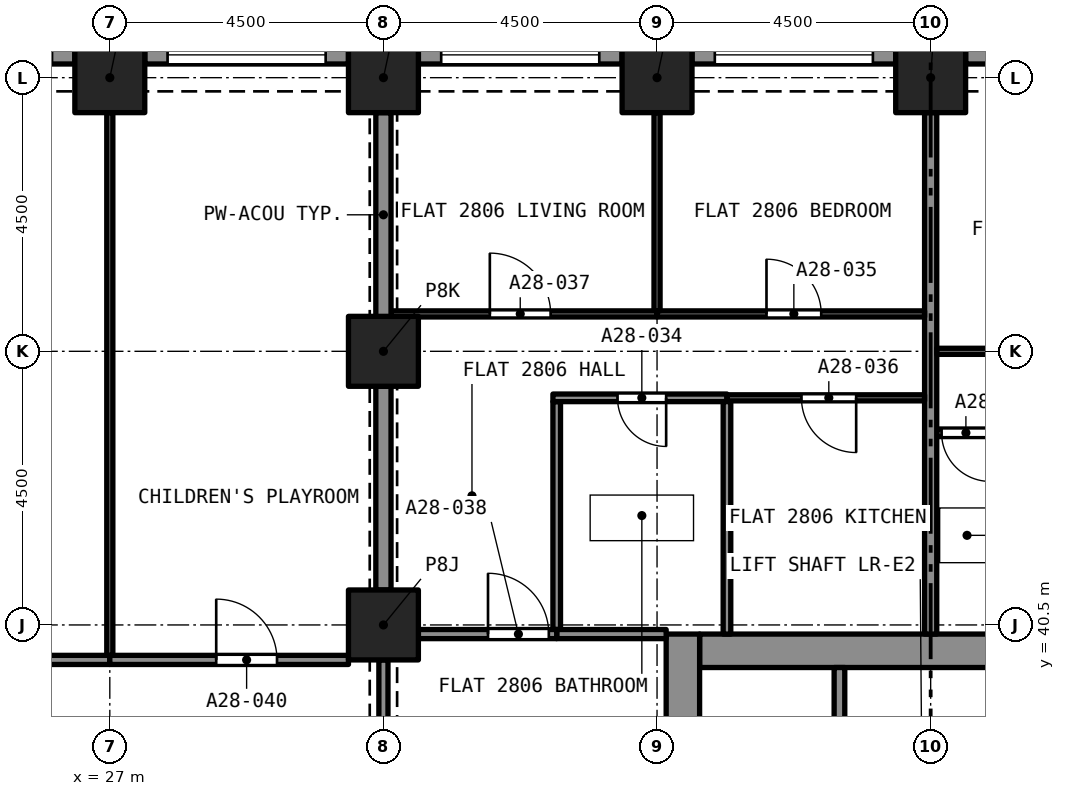
"""IFC4 building model, lengths in metres.
Left out: names, types, materials, properties, quantities, classifications, styles, units other than length and angle.
Written with IfcOpenShell. Run it as: python <this file> out.ifc"""

import sys

from ifc_helpers import new_model, si_unit, direction, frame, frame_2d, origin, origin_2d, place, context, subcontext, project, spatial, rectangle, extrude, element, fill, save


model = new_model("IFC4")
c1 = context("Model", 3, precision=1e-05, world=origin(), true_north=direction((0.0, 1.0)))
c2 = subcontext(c1, "Body", "Model", "MODEL_VIEW")
j1 = project(units=[si_unit("LENGTHUNIT", "METRE"), si_unit("PLANEANGLEUNIT", "RADIAN")], contexts=[c1])
p1 = place(None, origin())
s1 = spatial("IfcSite", under=j1, at=p1, CompositionType="ELEMENT")
p2 = place(p1, origin())
s2 = spatial("IfcBuilding", under=s1, at=p2, CompositionType="ELEMENT")
p3 = place(p2, frame((0.0, 0.0, 102.4)))
s3 = spatial("IfcBuildingStorey", under=s2, at=p3, CompositionType="ELEMENT", Elevation=102.4)
for number, where, z_axis, x_axis in (
    (1, (31.5, 40.5, 0.0), (0.0, 0.0, 1.0), (1.0, 0.0, 0.0)),
    (2, (31.5, 45.0, 0.0), (0.0, 0.0, 1.0), (1.0, 0.0, 0.0)),
    (3, (27.0, 49.5, 0.0), (0.0, 0.0, 1.0), (1.0, 0.0, 0.0)),
    (4, (31.5, 49.5, 0.0), (0.0, 0.0, 1.0), (1.0, 0.0, 0.0)),
    (5, (36.0, 49.5, 0.0), (0.0, 0.0, 1.0), (1.0, 0.0, 0.0)),
    (6, (40.5, 49.5, 0.0), (0.0, 0.0, 1.0), (1.0, 0.0, 0.0)),
):
    element("IfcColumn", number, at=place(p3, frame(where, z_axis=z_axis, x_axis=x_axis)), inside=s3, PredefinedType="COLUMN", context=c2, shape_type="SweptSolid", body=[
        extrude(rectangle(XDim=1.15, YDim=1.15, at=origin_2d()), origin(), (0.0, 0.0, 1.0), 3.2),
    ])
p4 = place(p3, frame((36.7, 40.075, 0.0), z_axis=(0.0, 0.0, 1.0), x_axis=(1.0, 0.0, 0.0)))
e7 = element("IfcWall", 7, at=p4, inside=s3, PredefinedType="SOLIDWALL", context=c2, shape_type="SweptSolid", body=[
    extrude(rectangle(XDim=7.6, YDim=0.55, at=frame_2d((3.8, 0.0))), origin(), (0.0, 0.0, 1.0), 3.2),
])
p5 = place(p3, frame((36.425, 27.15, 0.0), z_axis=(0.0, 0.0, 1.0), x_axis=(0.0, 1.0, 0.0)))
e8 = element("IfcWall", 8, at=p5, inside=s3, PredefinedType="SOLIDWALL", context=c2, shape_type="SweptSolid", body=[
    extrude(rectangle(XDim=13.2, YDim=0.55, at=frame_2d((6.6, 0.0))), origin(), (0.0, 0.0, 1.0), 3.2),
])
p6 = place(p5, frame((8.8, 0.0, 0.0)))
e9 = element("IfcOpeningElement", 9, at=p6, cuts=e8, PredefinedType="OPENING", context=c2, shape_type="SweptSolid", body=[
    extrude(rectangle(XDim=1.2, YDim=2.1, at=frame_2d((0.6, 1.05))), frame((0.0, 0.285, 0.0), z_axis=(0.0, -1.0, 0.0), x_axis=(1.0, 0.0, 0.0)), (0.0, 0.0, 1.0), 0.57),
])
p7 = place(p3, frame((41.075, 49.875, 0.0), z_axis=(0.0, 0.0, 1.0), x_axis=(1.0, 0.0, 0.0)))
e10 = element("IfcWall", 10, at=p7, inside=s3, PredefinedType="SOLIDWALL", context=c2, shape_type="SweptSolid", body=[
    extrude(rectangle(XDim=3.35, YDim=0.3, at=frame_2d((1.675, 0.0))), origin(), (0.0, 0.0, 1.0), 3.2),
])
p8 = place(p7, frame((0.375, 0.0, 0.45)))
e11 = element("IfcOpeningElement", 11, at=p8, cuts=e10, PredefinedType="OPENING", context=c2, shape_type="SweptSolid", body=[
    extrude(rectangle(XDim=2.6, YDim=1.95, at=frame_2d((1.3, 0.975))), frame((0.0, 0.16, 0.0), z_axis=(0.0, -1.0, 0.0), x_axis=(1.0, 0.0, 0.0)), (0.0, 0.0, 1.0), 0.32),
])
p9 = place(p3, frame((36.575, 49.875, 0.0), z_axis=(0.0, 0.0, 1.0), x_axis=(1.0, 0.0, 0.0)))
e12 = element("IfcWall", 12, at=p9, inside=s3, PredefinedType="SOLIDWALL", context=c2, shape_type="SweptSolid", body=[
    extrude(rectangle(XDim=3.35, YDim=0.3, at=frame_2d((1.675, 0.0))), origin(), (0.0, 0.0, 1.0), 3.2),
])
p10 = place(p9, frame((0.375, 0.0, 0.45)))
e13 = element("IfcOpeningElement", 13, at=p10, cuts=e12, PredefinedType="OPENING", context=c2, shape_type="SweptSolid", body=[
    extrude(rectangle(XDim=2.6, YDim=1.95, at=frame_2d((1.3, 0.975))), frame((0.0, 0.16, 0.0), z_axis=(0.0, -1.0, 0.0), x_axis=(1.0, 0.0, 0.0)), (0.0, 0.0, 1.0), 0.32),
])
p11 = place(p3, frame((32.075, 49.875, 0.0), z_axis=(0.0, 0.0, 1.0), x_axis=(1.0, 0.0, 0.0)))
e14 = element("IfcWall", 14, at=p11, inside=s3, PredefinedType="SOLIDWALL", context=c2, shape_type="SweptSolid", body=[
    extrude(rectangle(XDim=3.35, YDim=0.3, at=frame_2d((1.675, 0.0))), origin(), (0.0, 0.0, 1.0), 3.2),
])
p12 = place(p11, frame((0.375, 0.0, 0.45)))
e15 = element("IfcOpeningElement", 15, at=p12, cuts=e14, PredefinedType="OPENING", context=c2, shape_type="SweptSolid", body=[
    extrude(rectangle(XDim=2.6, YDim=1.95, at=frame_2d((1.3, 0.975))), frame((0.0, 0.16, 0.0), z_axis=(0.0, -1.0, 0.0), x_axis=(1.0, 0.0, 0.0)), (0.0, 0.0, 1.0), 0.32),
])
p13 = place(p3, frame((27.575, 49.875, 0.0), z_axis=(0.0, 0.0, 1.0), x_axis=(1.0, 0.0, 0.0)))
e16 = element("IfcWall", 16, at=p13, inside=s3, PredefinedType="SOLIDWALL", context=c2, shape_type="SweptSolid", body=[
    extrude(rectangle(XDim=3.35, YDim=0.3, at=frame_2d((1.675, 0.0))), origin(), (0.0, 0.0, 1.0), 3.2),
])
p14 = place(p13, frame((0.375, 0.0, 0.45)))
e17 = element("IfcOpeningElement", 17, at=p14, cuts=e16, PredefinedType="OPENING", context=c2, shape_type="SweptSolid", body=[
    extrude(rectangle(XDim=2.6, YDim=1.95, at=frame_2d((1.3, 0.975))), frame((0.0, 0.16, 0.0), z_axis=(0.0, -1.0, 0.0), x_axis=(1.0, 0.0, 0.0)), (0.0, 0.0, 1.0), 0.32),
])
p15 = place(p3, frame((23.075, 49.875, 0.0), z_axis=(0.0, 0.0, 1.0), x_axis=(1.0, 0.0, 0.0)))
e18 = element("IfcWall", 18, at=p15, inside=s3, PredefinedType="SOLIDWALL", context=c2, shape_type="SweptSolid", body=[
    extrude(rectangle(XDim=3.35, YDim=0.3, at=frame_2d((1.675, 0.0))), origin(), (0.0, 0.0, 1.0), 3.2),
])
p16 = place(p15, frame((0.375, 0.0, 0.45)))
e19 = element("IfcOpeningElement", 19, at=p16, cuts=e18, PredefinedType="OPENING", context=c2, shape_type="SweptSolid", body=[
    extrude(rectangle(XDim=2.6, YDim=1.95, at=frame_2d((1.3, 0.975))), frame((0.0, 0.16, 0.0), z_axis=(0.0, -1.0, 0.0), x_axis=(1.0, 0.0, 0.0)), (0.0, 0.0, 1.0), 0.32),
])
p17 = place(p3, frame((41.659, 43.66, 0.0), z_axis=(0.0, 0.0, 1.0), x_axis=(-1.0, 0.0, 0.0)))
e20 = element("IfcWall", 20, at=p17, inside=s3, PredefinedType="PARTITIONING", context=c2, shape_type="SweptSolid", body=[
    extrude(rectangle(XDim=1.059, YDim=0.125, at=frame_2d((0.53, 0.0))), origin(), (0.0, 0.0, 1.0), 2.9),
])
p18 = place(p17, frame((0.179, 0.0, 0.0)))
e21 = element("IfcOpeningElement", 21, at=p18, cuts=e20, PredefinedType="OPENING", context=c2, shape_type="SweptSolid", body=[
    extrude(rectangle(XDim=0.8, YDim=2.1, at=frame_2d((0.4, 1.05))), frame((0.0, 0.073, 0.0), z_axis=(0.0, -1.0, 0.0), x_axis=(1.0, 0.0, 0.0)), (0.0, 0.0, 1.0), 0.145),
])
p19 = place(p3, frame((40.5, 40.35, 0.0), z_axis=(0.0, 0.0, 1.0), x_axis=(0.0, 1.0, 0.0)))
e22 = element("IfcWall", 22, at=p19, inside=s3, PredefinedType="PARTITIONING", context=c2, shape_type="SweptSolid", body=[
    extrude(rectangle(XDim=8.575, YDim=0.2, at=frame_2d((4.288, 0.0))), origin(), (0.0, 0.0, 1.0), 2.9),
])
p20 = place(p3, frame((40.6, 45.0, 0.0), z_axis=(0.0, 0.0, 1.0), x_axis=(1.0, 0.0, 0.0)))
e23 = element("IfcWall", 23, at=p20, inside=s3, PredefinedType="PARTITIONING", context=c2, shape_type="SweptSolid", body=[
    extrude(rectangle(XDim=4.4, YDim=0.1, at=frame_2d((2.2, 0.0))), origin(), (0.0, 0.0, 1.0), 2.9),
])
p21 = place(p20, frame((1.7, 0.0, 0.0)))
e24 = element("IfcOpeningElement", 24, at=p21, cuts=e23, PredefinedType="OPENING", context=c2, shape_type="SweptSolid", body=[
    extrude(rectangle(XDim=0.9, YDim=2.1, at=frame_2d((0.45, 1.05))), frame((0.0, 0.06, 0.0), z_axis=(0.0, -1.0, 0.0), x_axis=(1.0, 0.0, 0.0)), (0.0, 0.0, 1.0), 0.12),
])
p22 = place(p3, frame((34.35, 40.425, 0.0), z_axis=(0.0, 0.0, 1.0), x_axis=(0.0, 1.0, 0.0)))
e25 = element("IfcWall", 25, at=p22, inside=s3, PredefinedType="PARTITIONING", context=c2, shape_type="SweptSolid", body=[
    extrude(rectangle(XDim=3.748, YDim=0.125, at=frame_2d((1.874, 0.0))), origin(), (0.0, 0.0, 1.0), 2.9),
])
p23 = place(p3, frame((37.15, 44.235, 0.0), z_axis=(0.0, 0.0, 1.0), x_axis=(-1.0, 0.0, 0.0)))
e26 = element("IfcWall", 26, at=p23, inside=s3, PredefinedType="PARTITIONING", context=c2, shape_type="SweptSolid", body=[
    extrude(rectangle(XDim=2.862, YDim=0.125, at=frame_2d((1.431, 0.0))), origin(), (0.0, 0.0, 1.0), 2.9),
])
p24 = place(p23, frame((1.0, 0.0, 0.0)))
e27 = element("IfcOpeningElement", 27, at=p24, cuts=e26, PredefinedType="OPENING", context=c2, shape_type="SweptSolid", body=[
    extrude(rectangle(XDim=0.8, YDim=2.1, at=frame_2d((0.4, 1.05))), frame((0.0, 0.073, 0.0), z_axis=(0.0, -1.0, 0.0), x_axis=(1.0, 0.0, 0.0)), (0.0, 0.0, 1.0), 0.145),
])
p25 = place(p3, frame((37.15, 40.35, 0.0), z_axis=(0.0, 0.0, 1.0), x_axis=(0.0, 1.0, 0.0)))
e28 = element("IfcWall", 28, at=p25, inside=s3, PredefinedType="PARTITIONING", context=c2, shape_type="SweptSolid", body=[
    extrude(rectangle(XDim=3.823, YDim=0.125, at=frame_2d((1.911, 0.0))), origin(), (0.0, 0.0, 1.0), 2.9),
])
p26 = place(p3, frame((34.35, 40.35, 0.0), z_axis=(0.0, 0.0, 1.0), x_axis=(1.0, 0.0, 0.0)))
e29 = element("IfcWall", 29, at=p26, inside=s3, PredefinedType="PARTITIONING", context=c2, shape_type="SweptSolid", body=[
    extrude(rectangle(XDim=1.8, YDim=0.15, at=frame_2d((0.9, 0.0))), origin(), (0.0, 0.0, 1.0), 2.9),
])
p27 = place(p3, frame((36.0, 45.615, 0.0), z_axis=(0.0, 0.0, 1.0), x_axis=(1.0, 0.0, 0.0)))
e30 = element("IfcWall", 30, at=p27, inside=s3, PredefinedType="PARTITIONING", context=c2, shape_type="SweptSolid", body=[
    extrude(rectangle(XDim=4.4, YDim=0.1, at=frame_2d((2.2, 0.0))), origin(), (0.0, 0.0, 1.0), 2.9),
])
p28 = place(p27, frame((1.8, 0.0, 0.0)))
e31 = element("IfcOpeningElement", 31, at=p28, cuts=e30, PredefinedType="OPENING", context=c2, shape_type="SweptSolid", body=[
    extrude(rectangle(XDim=0.9, YDim=2.1, at=frame_2d((0.45, 1.05))), frame((0.0, 0.06, 0.0), z_axis=(0.0, -1.0, 0.0), x_axis=(1.0, 0.0, 0.0)), (0.0, 0.0, 1.0), 0.12),
])
p29 = place(p3, frame((36.0, 45.665, 0.0), z_axis=(0.0, 0.0, 1.0), x_axis=(0.0, 1.0, 0.0)))
e32 = element("IfcWall", 32, at=p29, inside=s3, PredefinedType="PARTITIONING", context=c2, shape_type="SweptSolid", body=[
    extrude(rectangle(XDim=3.26, YDim=0.1, at=frame_2d((1.63, 0.0))), origin(), (0.0, 0.0, 1.0), 2.9),
])
p30 = place(p3, frame((40.4, 44.235, 0.0), z_axis=(0.0, 0.0, 1.0), x_axis=(-1.0, 0.0, 0.0)))
e33 = element("IfcWall", 33, at=p30, inside=s3, PredefinedType="PARTITIONING", context=c2, shape_type="SweptSolid", body=[
    extrude(rectangle(XDim=3.25, YDim=0.1, at=frame_2d((1.625, 0.0))), origin(), (0.0, 0.0, 1.0), 2.9),
])
p31 = place(p30, frame((1.125, 0.0, 0.0)))
e34 = element("IfcOpeningElement", 34, at=p31, cuts=e33, PredefinedType="OPENING", context=c2, shape_type="SweptSolid", body=[
    extrude(rectangle(XDim=0.9, YDim=2.1, at=frame_2d((0.45, 1.05))), frame((0.0, 0.06, 0.0), z_axis=(0.0, -1.0, 0.0), x_axis=(1.0, 0.0, 0.0)), (0.0, 0.0, 1.0), 0.12),
])
p32 = place(p3, frame((31.625, 45.615, 0.0), z_axis=(0.0, 0.0, 1.0), x_axis=(1.0, 0.0, 0.0)))
e35 = element("IfcWall", 35, at=p32, inside=s3, PredefinedType="PARTITIONING", context=c2, shape_type="SweptSolid", body=[
    extrude(rectangle(XDim=4.375, YDim=0.1, at=frame_2d((2.188, 0.0))), origin(), (0.0, 0.0, 1.0), 2.9),
])
p33 = place(p32, frame((1.625, 0.0, 0.0)))
e36 = element("IfcOpeningElement", 36, at=p33, cuts=e35, PredefinedType="OPENING", context=c2, shape_type="SweptSolid", body=[
    extrude(rectangle(XDim=1.0, YDim=2.1, at=frame_2d((0.5, 1.05))), frame((0.0, 0.06, 0.0), z_axis=(0.0, -1.0, 0.0), x_axis=(1.0, 0.0, 0.0)), (0.0, 0.0, 1.0), 0.12),
])
p34 = place(p3, frame((31.5, 41.075, 0.0), z_axis=(0.0, 0.0, 1.0), x_axis=(0.0, 1.0, 0.0)))
e37 = element("IfcWall", 37, at=p34, inside=s3, PredefinedType="PARTITIONING", context=c2, shape_type="SweptSolid", body=[
    extrude(rectangle(XDim=3.35, YDim=0.25, at=frame_2d((1.675, 0.0))), origin(), (0.0, 0.0, 1.0), 2.38),
])
p35 = place(p3, frame((32.075, 40.35, 0.0), z_axis=(0.0, 0.0, 1.0), x_axis=(1.0, 0.0, 0.0)))
e38 = element("IfcWall", 38, at=p35, inside=s3, PredefinedType="PARTITIONING", context=c2, shape_type="SweptSolid", body=[
    extrude(rectangle(XDim=2.275, YDim=0.15, at=frame_2d((1.138, 0.0))), origin(), (0.0, 0.0, 1.0), 2.9),
])
p36 = place(p35, frame((1.145, 0.0, 0.0)))
e39 = element("IfcOpeningElement", 39, at=p36, cuts=e38, PredefinedType="OPENING", context=c2, shape_type="SweptSolid", body=[
    extrude(rectangle(XDim=1.0, YDim=2.1, at=frame_2d((0.5, 1.05))), frame((0.0, 0.085, 0.0), z_axis=(0.0, -1.0, 0.0), x_axis=(1.0, 0.0, 0.0)), (0.0, 0.0, 1.0), 0.17),
])
p37 = place(p3, frame((31.5, 45.565, 0.0), z_axis=(0.0, 0.0, 1.0), x_axis=(0.0, 1.0, 0.0)))
e40 = element("IfcWall", 40, at=p37, inside=s3, PredefinedType="PARTITIONING", context=c2, shape_type="SweptSolid", body=[
    extrude(rectangle(XDim=3.36, YDim=0.25, at=frame_2d((1.68, 0.0))), origin(), (0.0, 0.0, 1.0), 2.38),
])
p38 = place(p3, frame((18.575, 39.925, 0.0), z_axis=(0.0, 0.0, 1.0), x_axis=(1.0, 0.0, 0.0)))
e41 = element("IfcWall", 41, at=p38, inside=s3, PredefinedType="PARTITIONING", context=c2, shape_type="SweptSolid", body=[
    extrude(rectangle(XDim=8.425, YDim=0.15, at=frame_2d((4.212, 0.0))), origin(), (0.0, 0.0, 1.0), 2.75),
])
p39 = place(p38, frame((3.425, 0.0, 0.0)))
e42 = element("IfcOpeningElement", 42, at=p39, cuts=e41, PredefinedType="OPENING", context=c2, shape_type="SweptSolid", body=[
    extrude(rectangle(XDim=1.0, YDim=2.1, at=frame_2d((0.5, 1.05))), frame((0.0, 0.085, 0.0), z_axis=(0.0, -1.0, 0.0), x_axis=(1.0, 0.0, 0.0)), (0.0, 0.0, 1.0), 0.17),
])
p40 = place(p3, frame((27.0, 39.925, 0.0), z_axis=(0.0, 0.0, 1.0), x_axis=(1.0, 0.0, 0.0)))
e43 = element("IfcWall", 43, at=p40, inside=s3, PredefinedType="PARTITIONING", context=c2, shape_type="SweptSolid", body=[
    extrude(rectangle(XDim=3.925, YDim=0.15, at=frame_2d((1.962, 0.0))), origin(), (0.0, 0.0, 1.0), 2.75),
])
p41 = place(p40, frame((1.75, 0.0, 0.0)))
e44 = element("IfcOpeningElement", 44, at=p41, cuts=e43, PredefinedType="OPENING", context=c2, shape_type="SweptSolid", body=[
    extrude(rectangle(XDim=1.0, YDim=2.1, at=frame_2d((0.5, 1.05))), frame((0.0, 0.085, 0.0), z_axis=(0.0, -1.0, 0.0), x_axis=(1.0, 0.0, 0.0)), (0.0, 0.0, 1.0), 0.17),
])
p42 = place(p3, frame((31.5, 36.575, 0.0), z_axis=(0.0, 0.0, 1.0), x_axis=(0.0, 1.0, 0.0)))
e45 = element("IfcWall", 45, at=p42, inside=s3, PredefinedType="PARTITIONING", context=c2, shape_type="SweptSolid", body=[
    extrude(rectangle(XDim=3.35, YDim=0.15, at=frame_2d((1.675, 0.0))), origin(), (0.0, 0.0, 1.0), 2.38),
])
p43 = place(p42, frame((1.075, 0.0, 0.0)))
e46 = element("IfcOpeningElement", 46, at=p43, cuts=e45, PredefinedType="OPENING", context=c2, shape_type="SweptSolid", body=[
    extrude(rectangle(XDim=1.2, YDim=2.1, at=frame_2d((0.6, 1.05))), frame((0.0, 0.085, 0.0), z_axis=(0.0, -1.0, 0.0), x_axis=(1.0, 0.0, 0.0)), (0.0, 0.0, 1.0), 0.17),
])
p44 = place(p3, frame((27.0, 40.0, 0.0), z_axis=(0.0, 0.0, 1.0), x_axis=(0.0, 1.0, 0.0)))
e47 = element("IfcWall", 47, at=p44, inside=s3, PredefinedType="PARTITIONING", context=c2, shape_type="SweptSolid", body=[
    extrude(rectangle(XDim=8.925, YDim=0.1, at=frame_2d((4.462, 0.0))), origin(), (0.0, 0.0, 1.0), 2.75),
])
p45 = place(p3, frame((39.0, 37.5, 0.0), z_axis=(0.0, 0.0, 1.0), x_axis=(0.0, 1.0, 0.0)))
e48 = element("IfcWall", 48, at=p45, inside=s3, PredefinedType="SOLIDWALL", context=c2, shape_type="SweptSolid", body=[
    extrude(rectangle(XDim=2.3, YDim=0.175, at=frame_2d((1.15, 0.0))), origin(), (0.0, 0.0, 1.0), 2.9),
])
p46 = place(p10, origin())
e49 = element("IfcWindow", 49, at=p46, inside=s3, PartitioningType="SINGLE_PANEL", PredefinedType="WINDOW", context=c2, shape_type="SweptSolid", body=[
    extrude(rectangle(XDim=2.6, YDim=1.95, at=frame_2d((1.3, 0.975))), frame((0.0, 0.03, 0.0), z_axis=(0.0, -1.0, 0.0), x_axis=(1.0, 0.0, 0.0)), (0.0, 0.0, 1.0), 0.06),
])
fill(e13, e49)
p47 = place(p12, origin())
e50 = element("IfcWindow", 50, at=p47, inside=s3, PartitioningType="SINGLE_PANEL", PredefinedType="WINDOW", context=c2, shape_type="SweptSolid", body=[
    extrude(rectangle(XDim=2.6, YDim=1.95, at=frame_2d((1.3, 0.975))), frame((0.0, 0.03, 0.0), z_axis=(0.0, -1.0, 0.0), x_axis=(1.0, 0.0, 0.0)), (0.0, 0.0, 1.0), 0.06),
])
fill(e15, e50)
p48 = place(p14, origin())
e51 = element("IfcWindow", 51, at=p48, inside=s3, PartitioningType="SINGLE_PANEL", PredefinedType="WINDOW", context=c2, shape_type="SweptSolid", body=[
    extrude(rectangle(XDim=2.6, YDim=1.95, at=frame_2d((1.3, 0.975))), frame((0.0, 0.03, 0.0), z_axis=(0.0, -1.0, 0.0), x_axis=(1.0, 0.0, 0.0)), (0.0, 0.0, 1.0), 0.06),
])
fill(e17, e51)
p49 = place(p18, origin())
e52 = element("IfcDoor", 52, at=p49, inside=s3, OperationType="SINGLE_SWING_RIGHT", PredefinedType="DOOR", context=c2, shape_type="SweptSolid", body=[
    extrude(rectangle(XDim=0.8, YDim=2.1, at=frame_2d((0.4, 1.05))), frame((0.0, 0.025, 0.0), z_axis=(0.0, -1.0, 0.0), x_axis=(1.0, 0.0, 0.0)), (0.0, 0.0, 1.0), 0.05),
])
fill(e21, e52)
p50 = place(p24, origin())
e53 = element("IfcDoor", 53, at=p50, inside=s3, OperationType="SINGLE_SWING_LEFT", PredefinedType="DOOR", context=c2, shape_type="SweptSolid", body=[
    extrude(rectangle(XDim=0.8, YDim=2.1, at=frame_2d((0.4, 1.05))), frame((0.0, 0.025, 0.0), z_axis=(0.0, -1.0, 0.0), x_axis=(1.0, 0.0, 0.0)), (0.0, 0.0, 1.0), 0.05),
])
fill(e27, e53)
p51 = place(p28, origin())
e54 = element("IfcDoor", 54, at=p51, inside=s3, OperationType="SINGLE_SWING_RIGHT", PredefinedType="DOOR", context=c2, shape_type="SweptSolid", body=[
    extrude(rectangle(XDim=0.9, YDim=2.1, at=frame_2d((0.45, 1.05))), frame((0.0, 0.025, 0.0), z_axis=(0.0, -1.0, 0.0), x_axis=(1.0, 0.0, 0.0)), (0.0, 0.0, 1.0), 0.05),
])
fill(e31, e54)
p52 = place(p31, origin())
e55 = element("IfcDoor", 55, at=p52, inside=s3, OperationType="SINGLE_SWING_LEFT", PredefinedType="DOOR", context=c2, shape_type="SweptSolid", body=[
    extrude(rectangle(XDim=0.9, YDim=2.1, at=frame_2d((0.45, 1.05))), frame((0.0, 0.025, 0.0), z_axis=(0.0, -1.0, 0.0), x_axis=(1.0, 0.0, 0.0)), (0.0, 0.0, 1.0), 0.05),
])
fill(e34, e55)
p53 = place(p33, origin())
e56 = element("IfcDoor", 56, at=p53, inside=s3, OperationType="SINGLE_SWING_LEFT", PredefinedType="DOOR", context=c2, shape_type="SweptSolid", body=[
    extrude(rectangle(XDim=1.0, YDim=2.1, at=frame_2d((0.5, 1.05))), frame((0.0, 0.025, 0.0), z_axis=(0.0, -1.0, 0.0), x_axis=(1.0, 0.0, 0.0)), (0.0, 0.0, 1.0), 0.05),
])
fill(e36, e56)
p54 = place(p36, origin())
e57 = element("IfcDoor", 57, at=p54, inside=s3, OperationType="SINGLE_SWING_RIGHT", PredefinedType="DOOR", context=c2, shape_type="SweptSolid", body=[
    extrude(rectangle(XDim=1.0, YDim=2.1, at=frame_2d((0.5, 1.05))), frame((0.0, 0.025, 0.0), z_axis=(0.0, -1.0, 0.0), x_axis=(1.0, 0.0, 0.0)), (0.0, 0.0, 1.0), 0.05),
])
fill(e39, e57)
p55 = place(p41, origin())
e58 = element("IfcDoor", 58, at=p55, inside=s3, OperationType="SINGLE_SWING_RIGHT", PredefinedType="DOOR", context=c2, shape_type="SweptSolid", body=[
    extrude(rectangle(XDim=1.0, YDim=2.1, at=frame_2d((0.5, 1.05))), frame((0.0, 0.025, 0.0), z_axis=(0.0, -1.0, 0.0), x_axis=(1.0, 0.0, 0.0)), (0.0, 0.0, 1.0), 0.05),
])
fill(e44, e58)
save(model, sys.argv[1])
